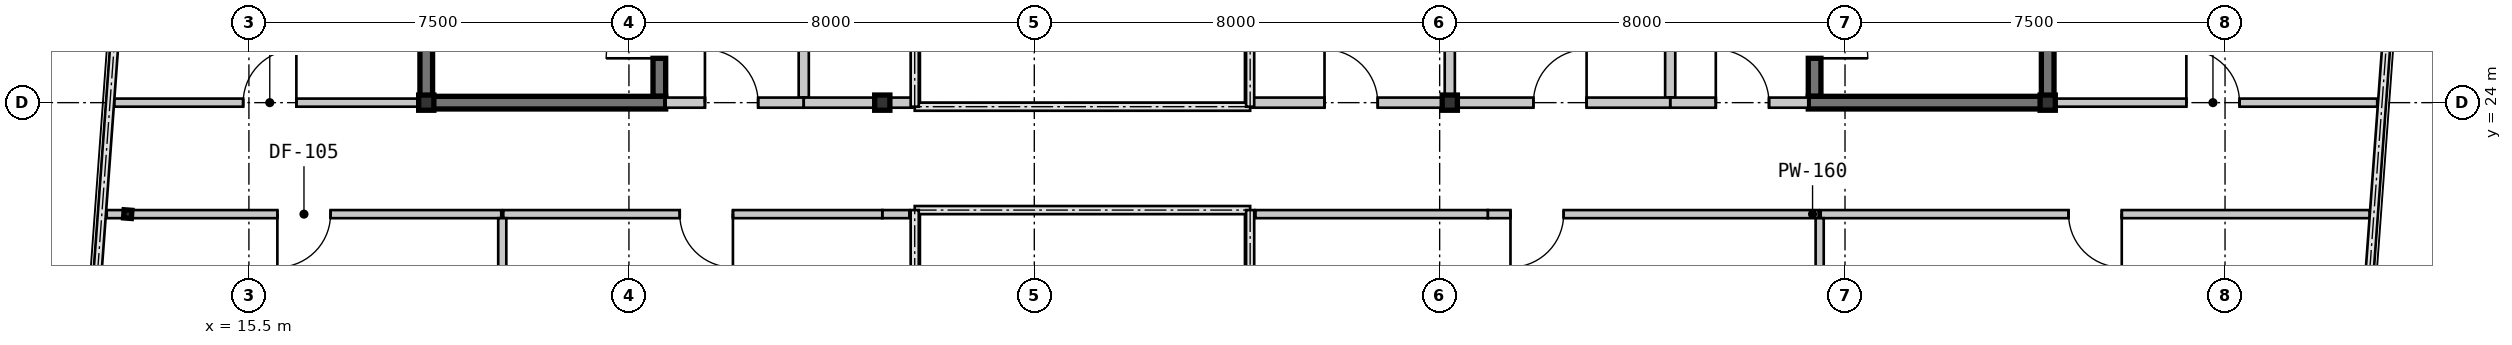
"""IFC4 building model, lengths in metres.
Left out: names, types, materials, properties, quantities, classifications, styles, units other than length and angle.
Written with IfcOpenShell. Run it as: python <this file> out.ifc"""

import sys

from ifc_helpers import new_model, si_unit, direction, frame, frame_2d, origin, origin_2d, place, context, subcontext, project, spatial, rectangle, hollow_rectangle, i_section, extrude, source, transform, mapped, element, fill, save


model = new_model("IFC4")
c1 = context("Model", 3, precision=1e-05, world=origin(), true_north=direction((0.0, 1.0)))
c2 = subcontext(c1, "Body", "Model", "MODEL_VIEW")
j1 = project(units=[si_unit("LENGTHUNIT", "METRE"), si_unit("PLANEANGLEUNIT", "RADIAN")], contexts=[c1])
p1 = place(None, origin())
s1 = spatial("IfcSite", under=j1, at=p1, CompositionType="ELEMENT")
p2 = place(p1, origin())
s2 = spatial("IfcBuilding", under=s1, at=p2, CompositionType="ELEMENT")
p3 = place(p2, frame((0.0, 0.0, 230.3)))
s3 = spatial("IfcBuildingStorey", under=s2, at=p3, CompositionType="ELEMENT", Elevation=230.3)
m1 = source(origin(), c2, "Body", "SweptSolid", [
    extrude(hollow_rectangle(XDim=0.3, YDim=0.3, WallThickness=0.012, at=origin_2d()), origin(), (0.0, 0.0, 1.0), 3.15),
])
for number, where, z_axis, x_axis in (
    (1, (19.0, 24.0, 0.0), (0.0, 0.0, 1.0), (1.0, 0.0, 0.0)),
    (2, (28.0, 24.0, 0.0), (0.0, 0.0, 1.0), (1.0, 0.0, 0.0)),
    (3, (39.2, 24.0, 0.0), (0.0, 0.0, 1.0), (1.0, 0.0, 0.0)),
    (4, (51.0, 24.0, 0.0), (0.0, 0.0, 1.0), (1.0, 0.0, 0.0)),
):
    element("IfcColumn", number, at=place(p3, frame(where, z_axis=z_axis, x_axis=x_axis)), inside=s3, PredefinedType="COLUMN", context=c2, shape_type="MappedRepresentation", body=[
        mapped(m1, transform((0.0, 0.0, 0.0), scale=1.0)),
    ])
m2 = source(origin(), c2, "Body", "SweptSolid", [
    extrude(i_section(OverallWidth=0.154, OverallDepth=0.162, WebThickness=0.008, FlangeThickness=0.011, at=origin_2d()), origin(), (0.0, 0.0, 1.0), 3.15),
])
p4 = place(p3, frame((13.109, 21.8, 0.0), z_axis=(0.0, 0.0, 1.0), x_axis=(0.997314477224, -0.073238197128, 0.0)))
e5 = element("IfcColumn", 5, at=p4, inside=s3, PredefinedType="COLUMN", context=c2, shape_type="MappedRepresentation", body=[
    mapped(m2, transform((0.0, 0.0, 0.0), scale=1.0)),
])
m3 = source(origin(), c2, "Body", "SweptSolid", [
    extrude(rectangle(XDim=4.075, YDim=0.25, at=frame_2d((2.038, 0.0))), origin(), (0.0, 0.0, 1.0), 2.93),
])
for number, where, z_axis, x_axis in (
    (6, (19.0, 24.125, 0.0), (0.0, 0.0, 1.0), (0.0, 1.0, 0.0)),
    (7, (51.0, 24.125, 0.0), (0.0, 0.0, 1.0), (0.0, 1.0, 0.0)),
):
    element("IfcWall", number, at=place(p3, frame(where, z_axis=z_axis, x_axis=x_axis)), inside=s3, PredefinedType="SHEAR", context=c2, shape_type="MappedRepresentation", body=[
        mapped(m3, transform((0.0, 0.0, 0.0), scale=1.0)),
    ])
m4 = source(origin(), c2, "Body", "SweptSolid", [
    extrude(rectangle(XDim=3.95, YDim=0.25, at=frame_2d((1.975, 0.0))), origin(), (0.0, 0.0, 1.0), 2.93),
])
p5 = place(p3, frame((23.6, 24.125, 0.0), z_axis=(0.0, 0.0, 1.0), x_axis=(0.0, 1.0, 0.0)))
e8 = element("IfcWall", 8, at=p5, inside=s3, PredefinedType="SHEAR", context=c2, shape_type="MappedRepresentation", body=[
    mapped(m4, transform((0.0, 0.0, 0.0), scale=1.0)),
])
m5 = source(origin(), c2, "Body", "SweptSolid", [
    extrude(rectangle(XDim=1.05, YDim=2.1, at=frame_2d((0.525, 1.05))), frame((0.0, 0.135, 0.0), z_axis=(0.0, -1.0, 0.0), x_axis=(1.0, 0.0, 0.0)), (0.0, 0.0, 1.0), 0.27),
])
p6 = place(p5, frame((0.75, 0.0, 0.0)))
e9 = element("IfcOpeningElement", 9, at=p6, cuts=e8, PredefinedType="OPENING", context=c2, shape_type="MappedRepresentation", body=[
    mapped(m5, transform((0.0, 0.0, 0.0), scale=1.0)),
])
m6 = source(origin(), c2, "Body", "SweptSolid", [
    extrude(rectangle(XDim=4.85, YDim=0.25, at=frame_2d((2.425, 0.0))), origin(), (0.0, 0.0, 1.0), 2.93),
])
p7 = place(p3, frame((18.875, 24.0, 0.0), z_axis=(0.0, 0.0, 1.0), x_axis=(1.0, 0.0, 0.0)))
e10 = element("IfcWall", 10, at=p7, inside=s3, PredefinedType="SHEAR", context=c2, shape_type="MappedRepresentation", body=[
    mapped(m6, transform((0.0, 0.0, 0.0), scale=1.0)),
])
m7 = source(origin(), c2, "Body", "SweptSolid", [
    extrude(rectangle(XDim=4.0, YDim=0.2, at=frame_2d((2.0, 0.0))), origin(), (0.0, 0.0, 1.0), 2.93),
])
p8 = place(p3, frame((26.45, 24.1, 0.0), z_axis=(0.0, 0.0, 1.0), x_axis=(0.0, 1.0, 0.0)))
e11 = element("IfcWall", 11, at=p8, inside=s3, PredefinedType="SOLIDWALL", context=c2, shape_type="MappedRepresentation", body=[
    mapped(m7, transform((0.0, 0.0, 0.0), scale=1.0)),
])
m8 = source(origin(), c2, "Body", "SweptSolid", [
    extrude(rectangle(XDim=0.86, YDim=2.1, at=frame_2d((0.43, 1.05))), frame((0.0, 0.11, 0.0), z_axis=(0.0, -1.0, 0.0), x_axis=(1.0, 0.0, 0.0)), (0.0, 0.0, 1.0), 0.22),
])
p9 = place(p8, frame((1.32, 0.0, 0.0)))
e12 = element("IfcOpeningElement", 12, at=p9, cuts=e11, PredefinedType="OPENING", context=c2, shape_type="MappedRepresentation", body=[
    mapped(m8, transform((0.0, 0.0, 0.0), scale=1.0)),
])
m9 = source(origin(), c2, "Body", "SweptSolid", [
    extrude(rectangle(XDim=2.725, YDim=0.2, at=frame_2d((1.362, 0.0))), origin(), (0.0, 0.0, 1.0), 2.47),
])
p10 = place(p3, frame((23.725, 24.0, 0.0), z_axis=(0.0, 0.0, 1.0), x_axis=(1.0, 0.0, 0.0)))
e13 = element("IfcWall", 13, at=p10, inside=s3, PredefinedType="SOLIDWALL", context=c2, shape_type="MappedRepresentation", body=[
    mapped(m9, transform((0.0, 0.0, 0.0), scale=1.0)),
])
m10 = source(origin(), c2, "Body", "SweptSolid", [
    extrude(rectangle(XDim=1.05, YDim=2.1, at=frame_2d((0.525, 1.05))), frame((0.0, 0.11, 0.0), z_axis=(0.0, -1.0, 0.0), x_axis=(1.0, 0.0, 0.0)), (0.0, 0.0, 1.0), 0.22),
])
p11 = place(p10, frame((0.775, 0.0, 0.0)))
e14 = element("IfcOpeningElement", 14, at=p11, cuts=e13, PredefinedType="OPENING", context=c2, shape_type="MappedRepresentation", body=[
    mapped(m10, transform((0.0, 0.0, 0.0), scale=1.0)),
])
p12 = place(p3, frame((46.4, 28.075, 0.0), z_axis=(0.0, 0.0, 1.0), x_axis=(0.0, -1.0, 0.0)))
e15 = element("IfcWall", 15, at=p12, inside=s3, PredefinedType="SHEAR", context=c2, shape_type="MappedRepresentation", body=[
    mapped(m4, transform((0.0, 0.0, 0.0), scale=1.0)),
])
p13 = place(p12, frame((2.15, 0.0, 0.0)))
e16 = element("IfcOpeningElement", 16, at=p13, cuts=e15, PredefinedType="OPENING", context=c2, shape_type="MappedRepresentation", body=[
    mapped(m5, transform((0.0, 0.0, 0.0), scale=1.0)),
])
p14 = place(p3, frame((46.275, 24.0, 0.0), z_axis=(0.0, 0.0, 1.0), x_axis=(1.0, 0.0, 0.0)))
e17 = element("IfcWall", 17, at=p14, inside=s3, PredefinedType="SHEAR", context=c2, shape_type="MappedRepresentation", body=[
    mapped(m6, transform((0.0, 0.0, 0.0), scale=1.0)),
])
m11 = source(origin(), c2, "Body", "SweptSolid", [
    extrude(rectangle(XDim=3.975, YDim=0.2, at=frame_2d((1.987, 0.0))), origin(), (0.0, 0.0, 1.0), 2.93),
])
p15 = place(p3, frame((43.55, 28.075, 0.0), z_axis=(0.0, 0.0, 1.0), x_axis=(0.0, -1.0, 0.0)))
e18 = element("IfcWall", 18, at=p15, inside=s3, PredefinedType="SOLIDWALL", context=c2, shape_type="MappedRepresentation", body=[
    mapped(m11, transform((0.0, 0.0, 0.0), scale=1.0)),
])
m12 = source(origin(), c2, "Body", "SweptSolid", [
    extrude(rectangle(XDim=2.725, YDim=0.2, at=frame_2d((1.362, 0.0))), origin(), (0.0, 0.0, 1.0), 2.397),
])
p16 = place(p3, frame((43.55, 24.0, 0.0), z_axis=(0.0, 0.0, 1.0), x_axis=(1.0, 0.0, 0.0)))
e19 = element("IfcWall", 19, at=p16, inside=s3, PredefinedType="SOLIDWALL", context=c2, shape_type="MappedRepresentation", body=[
    mapped(m12, transform((0.0, 0.0, 0.0), scale=1.0)),
])
p17 = place(p16, frame((0.9, 0.0, 0.0)))
e20 = element("IfcOpeningElement", 20, at=p17, cuts=e19, PredefinedType="OPENING", context=c2, shape_type="MappedRepresentation", body=[
    mapped(m10, transform((0.0, 0.0, 0.0), scale=1.0)),
])
m13 = source(origin(), c2, "Body", "SweptSolid", [
    extrude(rectangle(XDim=0.594, YDim=0.2, at=frame_2d((0.297, 0.0))), origin(), (0.0, 0.0, 1.0), 2.23),
])
p18 = place(p3, frame((28.594, 24.0, 0.0), z_axis=(0.0, 0.0, 1.0), x_axis=(-1.0, 0.0, 0.0)))
e21 = element("IfcWall", 21, at=p18, inside=s3, PredefinedType="SOLIDWALL", context=c2, shape_type="MappedRepresentation", body=[
    mapped(m13, transform((0.0, 0.0, 0.0), scale=1.0)),
])
m14 = source(origin(), c2, "Body", "SweptSolid", [
    extrude(rectangle(XDim=1.55, YDim=0.2, at=frame_2d((0.775, 0.0))), origin(), (0.0, 0.0, 1.0), 2.47),
])
p19 = place(p3, frame((28.0, 24.0, 0.0), z_axis=(0.0, 0.0, 1.0), x_axis=(-1.0, 0.0, 0.0)))
e22 = element("IfcWall", 22, at=p19, inside=s3, PredefinedType="SOLIDWALL", context=c2, shape_type="MappedRepresentation", body=[
    mapped(m14, transform((0.0, 0.0, 0.0), scale=1.0)),
])
m15 = source(origin(), c2, "Body", "SweptSolid", [
    extrude(rectangle(XDim=3.975, YDim=0.2, at=frame_2d((1.987, 0.0))), origin(), (0.0, 0.0, 1.0), 2.47),
])
p20 = place(p3, frame((39.2, 28.075, 0.0), z_axis=(0.0, 0.0, 1.0), x_axis=(0.0, -1.0, 0.0)))
e23 = element("IfcWall", 23, at=p20, inside=s3, PredefinedType="SOLIDWALL", context=c2, shape_type="MappedRepresentation", body=[
    mapped(m15, transform((0.0, 0.0, 0.0), scale=1.0)),
])
m16 = source(origin(), c2, "Body", "SweptSolid", [
    extrude(rectangle(XDim=3.895, YDim=0.2, at=frame_2d((1.947, 0.0))), origin(), (0.0, 0.0, 1.0), 2.23),
])
p21 = place(p3, frame((39.2, 24.0, 0.0), z_axis=(0.0, 0.0, 1.0), x_axis=(-1.0, 0.0, 0.0)))
e24 = element("IfcWall", 24, at=p21, inside=s3, PredefinedType="SOLIDWALL", context=c2, shape_type="MappedRepresentation", body=[
    mapped(m16, transform((0.0, 0.0, 0.0), scale=1.0)),
])
p22 = place(p21, frame((1.422, 0.0, 0.0)))
e25 = element("IfcOpeningElement", 25, at=p22, cuts=e24, PredefinedType="OPENING", context=c2, shape_type="MappedRepresentation", body=[
    mapped(m10, transform((0.0, 0.0, 0.0), scale=1.0)),
])
m17 = source(origin(), c2, "Body", "SweptSolid", [
    extrude(rectangle(XDim=4.35, YDim=0.2, at=frame_2d((2.175, 0.0))), origin(), (0.0, 0.0, 1.0), 2.397),
])
p23 = place(p3, frame((43.55, 24.0, 0.0), z_axis=(0.0, 0.0, 1.0), x_axis=(-1.0, 0.0, 0.0)))
e26 = element("IfcWall", 26, at=p23, inside=s3, PredefinedType="SOLIDWALL", context=c2, shape_type="MappedRepresentation", body=[
    mapped(m17, transform((0.0, 0.0, 0.0), scale=1.0)),
])
p24 = place(p23, frame((1.65, 0.0, 0.0)))
e27 = element("IfcOpeningElement", 27, at=p24, cuts=e26, PredefinedType="OPENING", context=c2, shape_type="MappedRepresentation", body=[
    mapped(m10, transform((0.0, 0.0, 0.0), scale=1.0)),
])
m18 = source(origin(), c2, "Body", "SweptSolid", [
    extrude(rectangle(XDim=6.032, YDim=0.16, at=frame_2d((3.016, 0.0))), origin(), (0.0, 0.0, 1.0), 2.93),
])
p25 = place(p3, frame((12.843, 24.0, 0.0), z_axis=(0.0, 0.0, 1.0), x_axis=(1.0, 0.0, 0.0)))
e28 = element("IfcWall", 28, at=p25, inside=s3, PredefinedType="PARTITIONING", context=c2, shape_type="MappedRepresentation", body=[
    mapped(m18, transform((0.0, 0.0, 0.0), scale=1.0)),
])
m19 = source(origin(), c2, "Body", "SweptSolid", [
    extrude(rectangle(XDim=1.05, YDim=2.1, at=frame_2d((0.525, 1.05))), frame((0.0, 0.09, 0.0), z_axis=(0.0, -1.0, 0.0), x_axis=(1.0, 0.0, 0.0)), (0.0, 0.0, 1.0), 0.18),
])
p26 = place(p25, frame((2.543, 0.0, 0.0)))
e29 = element("IfcOpeningElement", 29, at=p26, cuts=e28, PredefinedType="OPENING", context=c2, shape_type="MappedRepresentation", body=[
    mapped(m19, transform((0.0, 0.0, 0.0), scale=1.0)),
])
m20 = source(origin(), c2, "Body", "SweptSolid", [
    extrude(rectangle(XDim=6.378, YDim=0.16, at=frame_2d((3.189, 0.0))), origin(), (0.0, 0.0, 1.0), 2.93),
])
p27 = place(p3, frame((51.125, 24.0, 0.0), z_axis=(0.0, 0.0, 1.0), x_axis=(1.0, 0.0, 0.0)))
e30 = element("IfcWall", 30, at=p27, inside=s3, PredefinedType="PARTITIONING", context=c2, shape_type="MappedRepresentation", body=[
    mapped(m20, transform((0.0, 0.0, 0.0), scale=1.0)),
])
p28 = place(p27, frame((2.612, 0.0, 0.0)))
e31 = element("IfcOpeningElement", 31, at=p28, cuts=e30, PredefinedType="OPENING", context=c2, shape_type="MappedRepresentation", body=[
    mapped(m19, transform((0.0, 0.0, 0.0), scale=1.0)),
])
m21 = source(origin(), c2, "Body", "SweptSolid", [
    extrude(rectangle(XDim=7.786, YDim=0.16, at=frame_2d((3.893, 0.0))), origin(), (0.0, 0.0, 1.0), 2.93),
])
p29 = place(p3, frame((20.48, 21.8, 0.0), z_axis=(0.0, 0.0, 1.0), x_axis=(-1.0, 0.0, 0.0)))
e32 = element("IfcWall", 32, at=p29, inside=s3, PredefinedType="PARTITIONING", context=c2, shape_type="MappedRepresentation", body=[
    mapped(m21, transform((0.0, 0.0, 0.0), scale=1.0)),
])
p30 = place(p29, frame((3.368, 0.0, 0.0)))
e33 = element("IfcOpeningElement", 33, at=p30, cuts=e32, PredefinedType="OPENING", context=c2, shape_type="MappedRepresentation", body=[
    mapped(m19, transform((0.0, 0.0, 0.0), scale=1.0)),
])
m22 = source(origin(), c2, "Body", "SweptSolid", [
    extrude(rectangle(XDim=0.534, YDim=0.16, at=frame_2d((0.267, 0.0))), origin(), (0.0, 0.0, 1.0), 2.23),
])
p31 = place(p3, frame((28.534, 21.8, 0.0), z_axis=(0.0, 0.0, 1.0), x_axis=(-1.0, 0.0, 0.0)))
e34 = element("IfcWall", 34, at=p31, inside=s3, PredefinedType="PARTITIONING", context=c2, shape_type="MappedRepresentation", body=[
    mapped(m22, transform((0.0, 0.0, 0.0), scale=1.0)),
])
m23 = source(origin(), c2, "Body", "SweptSolid", [
    extrude(rectangle(XDim=7.48, YDim=0.16, at=frame_2d((3.74, 0.0))), origin(), (0.0, 0.0, 1.0), 2.93),
])
p32 = place(p3, frame((28.0, 21.8, 0.0), z_axis=(0.0, 0.0, 1.0), x_axis=(-1.0, 0.0, 0.0)))
e35 = element("IfcWall", 35, at=p32, inside=s3, PredefinedType="PARTITIONING", context=c2, shape_type="MappedRepresentation", body=[
    mapped(m23, transform((0.0, 0.0, 0.0), scale=1.0)),
])
p33 = place(p32, frame((2.948, 0.0, 0.0)))
e36 = element("IfcOpeningElement", 36, at=p33, cuts=e35, PredefinedType="OPENING", context=c2, shape_type="MappedRepresentation", body=[
    mapped(m19, transform((0.0, 0.0, 0.0), scale=1.0)),
])
m24 = source(origin(), c2, "Body", "SweptSolid", [
    extrude(rectangle(XDim=6.53, YDim=0.16, at=frame_2d((3.265, 0.0))), origin(), (0.0, 0.0, 1.0), 2.93),
])
p34 = place(p3, frame((46.48, 21.8, 0.0), z_axis=(0.0, 0.0, 1.0), x_axis=(-1.0, 0.0, 0.0)))
e37 = element("IfcWall", 37, at=p34, inside=s3, PredefinedType="PARTITIONING", context=c2, shape_type="MappedRepresentation", body=[
    mapped(m24, transform((0.0, 0.0, 0.0), scale=1.0)),
])
p35 = place(p34, frame((5.032, 0.0, 0.0)))
e38 = element("IfcOpeningElement", 38, at=p35, cuts=e37, PredefinedType="OPENING", context=c2, shape_type="MappedRepresentation", body=[
    mapped(m19, transform((0.0, 0.0, 0.0), scale=1.0)),
])
m25 = source(origin(), c2, "Body", "SweptSolid", [
    extrude(rectangle(XDim=4.584, YDim=0.16, at=frame_2d((2.292, 0.0))), origin(), (0.0, 0.0, 1.0), 2.23),
])
p36 = place(p3, frame((39.95, 21.8, 0.0), z_axis=(0.0, 0.0, 1.0), x_axis=(-1.0, 0.0, 0.0)))
e39 = element("IfcWall", 39, at=p36, inside=s3, PredefinedType="PARTITIONING", context=c2, shape_type="MappedRepresentation", body=[
    mapped(m25, transform((0.0, 0.0, 0.0), scale=1.0)),
])
m26 = source(origin(), c2, "Body", "SweptSolid", [
    extrude(rectangle(XDim=10.833, YDim=0.16, at=frame_2d((5.417, 0.0))), origin(), (0.0, 0.0, 1.0), 2.93),
])
p37 = place(p3, frame((57.353, 21.8, 0.0), z_axis=(0.0, 0.0, 1.0), x_axis=(-1.0, 0.0, 0.0)))
e40 = element("IfcWall", 40, at=p37, inside=s3, PredefinedType="PARTITIONING", context=c2, shape_type="MappedRepresentation", body=[
    mapped(m26, transform((0.0, 0.0, 0.0), scale=1.0)),
])
p38 = place(p37, frame((4.892, 0.0, 0.0)))
e41 = element("IfcOpeningElement", 41, at=p38, cuts=e40, PredefinedType="OPENING", context=c2, shape_type="MappedRepresentation", body=[
    mapped(m19, transform((0.0, 0.0, 0.0), scale=1.0)),
])
m27 = source(origin(), c2, "Body", "SweptSolid", [
    extrude(rectangle(XDim=16.069, YDim=0.16, at=frame_2d((8.034, 0.0))), origin(), (0.0, 0.0, 1.0), 2.93),
])
p39 = place(p3, frame((20.5, 21.72, 0.0), z_axis=(0.0, 0.0, 1.0), x_axis=(0.0, -1.0, 0.0)))
e42 = element("IfcWall", 42, at=p39, inside=s3, PredefinedType="PARTITIONING", context=c2, shape_type="MappedRepresentation", body=[
    mapped(m27, transform((0.0, 0.0, 0.0), scale=1.0)),
])
m28 = source(origin(), c2, "Body", "SweptSolid", [
    extrude(rectangle(XDim=17.978, YDim=0.16, at=frame_2d((8.989, 0.0))), origin(), (0.0, 0.0, 1.0), 2.93),
])
p40 = place(p3, frame((46.5, 21.72, 0.0), z_axis=(0.0, 0.0, 1.0), x_axis=(0.0, -1.0, 0.0)))
e43 = element("IfcWall", 43, at=p40, inside=s3, PredefinedType="PARTITIONING", context=c2, shape_type="MappedRepresentation", body=[
    mapped(m28, transform((0.0, 0.0, 0.0), scale=1.0)),
])
m29 = source(origin(), c2, "Body", "SweptSolid", [
    extrude(rectangle(XDim=1.05, YDim=2.1, at=frame_2d((0.525, 1.05))), frame((0.0, 0.025, 0.0), z_axis=(0.0, -1.0, 0.0), x_axis=(1.0, 0.0, 0.0)), (0.0, 0.0, 1.0), 0.05),
])
p41 = place(p6, origin())
e44 = element("IfcDoor", 44, at=p41, inside=s3, OperationType="SINGLE_SWING_LEFT", PredefinedType="DOOR", context=c2, shape_type="MappedRepresentation", body=[
    mapped(m29, transform((0.0, 0.0, 0.0), scale=1.0)),
])
fill(e9, e44)
p42 = place(p11, origin())
e45 = element("IfcDoor", 45, at=p42, inside=s3, OperationType="SINGLE_SWING_LEFT", PredefinedType="DOOR", context=c2, shape_type="MappedRepresentation", body=[
    mapped(m29, transform((0.0, 0.0, 0.0), scale=1.0)),
])
fill(e14, e45)
p43 = place(p13, origin())
e46 = element("IfcDoor", 46, at=p43, inside=s3, OperationType="SINGLE_SWING_RIGHT", PredefinedType="DOOR", context=c2, shape_type="MappedRepresentation", body=[
    mapped(m29, transform((0.0, 0.0, 0.0), scale=1.0)),
])
fill(e16, e46)
p44 = place(p17, origin())
e47 = element("IfcDoor", 47, at=p44, inside=s3, OperationType="SINGLE_SWING_LEFT", PredefinedType="DOOR", context=c2, shape_type="MappedRepresentation", body=[
    mapped(m29, transform((0.0, 0.0, 0.0), scale=1.0)),
])
fill(e20, e47)
p45 = place(p22, frame((1.05, 0.0, 0.0), z_axis=(0.0, 0.0, 1.0), x_axis=(-1.0, 0.0, 0.0)))
e48 = element("IfcDoor", 48, at=p45, inside=s3, OperationType="SINGLE_SWING_LEFT", PredefinedType="DOOR", context=c2, shape_type="MappedRepresentation", body=[
    mapped(m29, transform((0.0, 0.0, 0.0), scale=1.0)),
])
fill(e25, e48)
p46 = place(p24, frame((1.05, 0.0, 0.0), z_axis=(0.0, 0.0, 1.0), x_axis=(-1.0, 0.0, 0.0)))
e49 = element("IfcDoor", 49, at=p46, inside=s3, OperationType="SINGLE_SWING_RIGHT", PredefinedType="DOOR", context=c2, shape_type="MappedRepresentation", body=[
    mapped(m29, transform((0.0, 0.0, 0.0), scale=1.0)),
])
fill(e27, e49)
p47 = place(p26, origin())
e50 = element("IfcDoor", 50, at=p47, inside=s3, OperationType="SINGLE_SWING_RIGHT", PredefinedType="DOOR", context=c2, shape_type="MappedRepresentation", body=[
    mapped(m29, transform((0.0, 0.0, 0.0), scale=1.0)),
])
fill(e29, e50)
p48 = place(p28, origin())
e51 = element("IfcDoor", 51, at=p48, inside=s3, OperationType="SINGLE_SWING_LEFT", PredefinedType="DOOR", context=c2, shape_type="MappedRepresentation", body=[
    mapped(m29, transform((0.0, 0.0, 0.0), scale=1.0)),
])
fill(e31, e51)
p49 = place(p30, origin())
e52 = element("IfcDoor", 52, at=p49, inside=s3, OperationType="SINGLE_SWING_RIGHT", PredefinedType="DOOR", context=c2, shape_type="MappedRepresentation", body=[
    mapped(m29, transform((0.0, 0.0, 0.0), scale=1.0)),
])
fill(e33, e52)
p50 = place(p33, origin())
e53 = element("IfcDoor", 53, at=p50, inside=s3, OperationType="SINGLE_SWING_LEFT", PredefinedType="DOOR", context=c2, shape_type="MappedRepresentation", body=[
    mapped(m29, transform((0.0, 0.0, 0.0), scale=1.0)),
])
fill(e36, e53)
p51 = place(p35, origin())
e54 = element("IfcDoor", 54, at=p51, inside=s3, OperationType="SINGLE_SWING_RIGHT", PredefinedType="DOOR", context=c2, shape_type="MappedRepresentation", body=[
    mapped(m29, transform((0.0, 0.0, 0.0), scale=1.0)),
])
fill(e38, e54)
p52 = place(p38, origin())
e55 = element("IfcDoor", 55, at=p52, inside=s3, OperationType="SINGLE_SWING_LEFT", PredefinedType="DOOR", context=c2, shape_type="MappedRepresentation", body=[
    mapped(m29, transform((0.0, 0.0, 0.0), scale=1.0)),
])
fill(e41, e55)
save(model, sys.argv[1])
